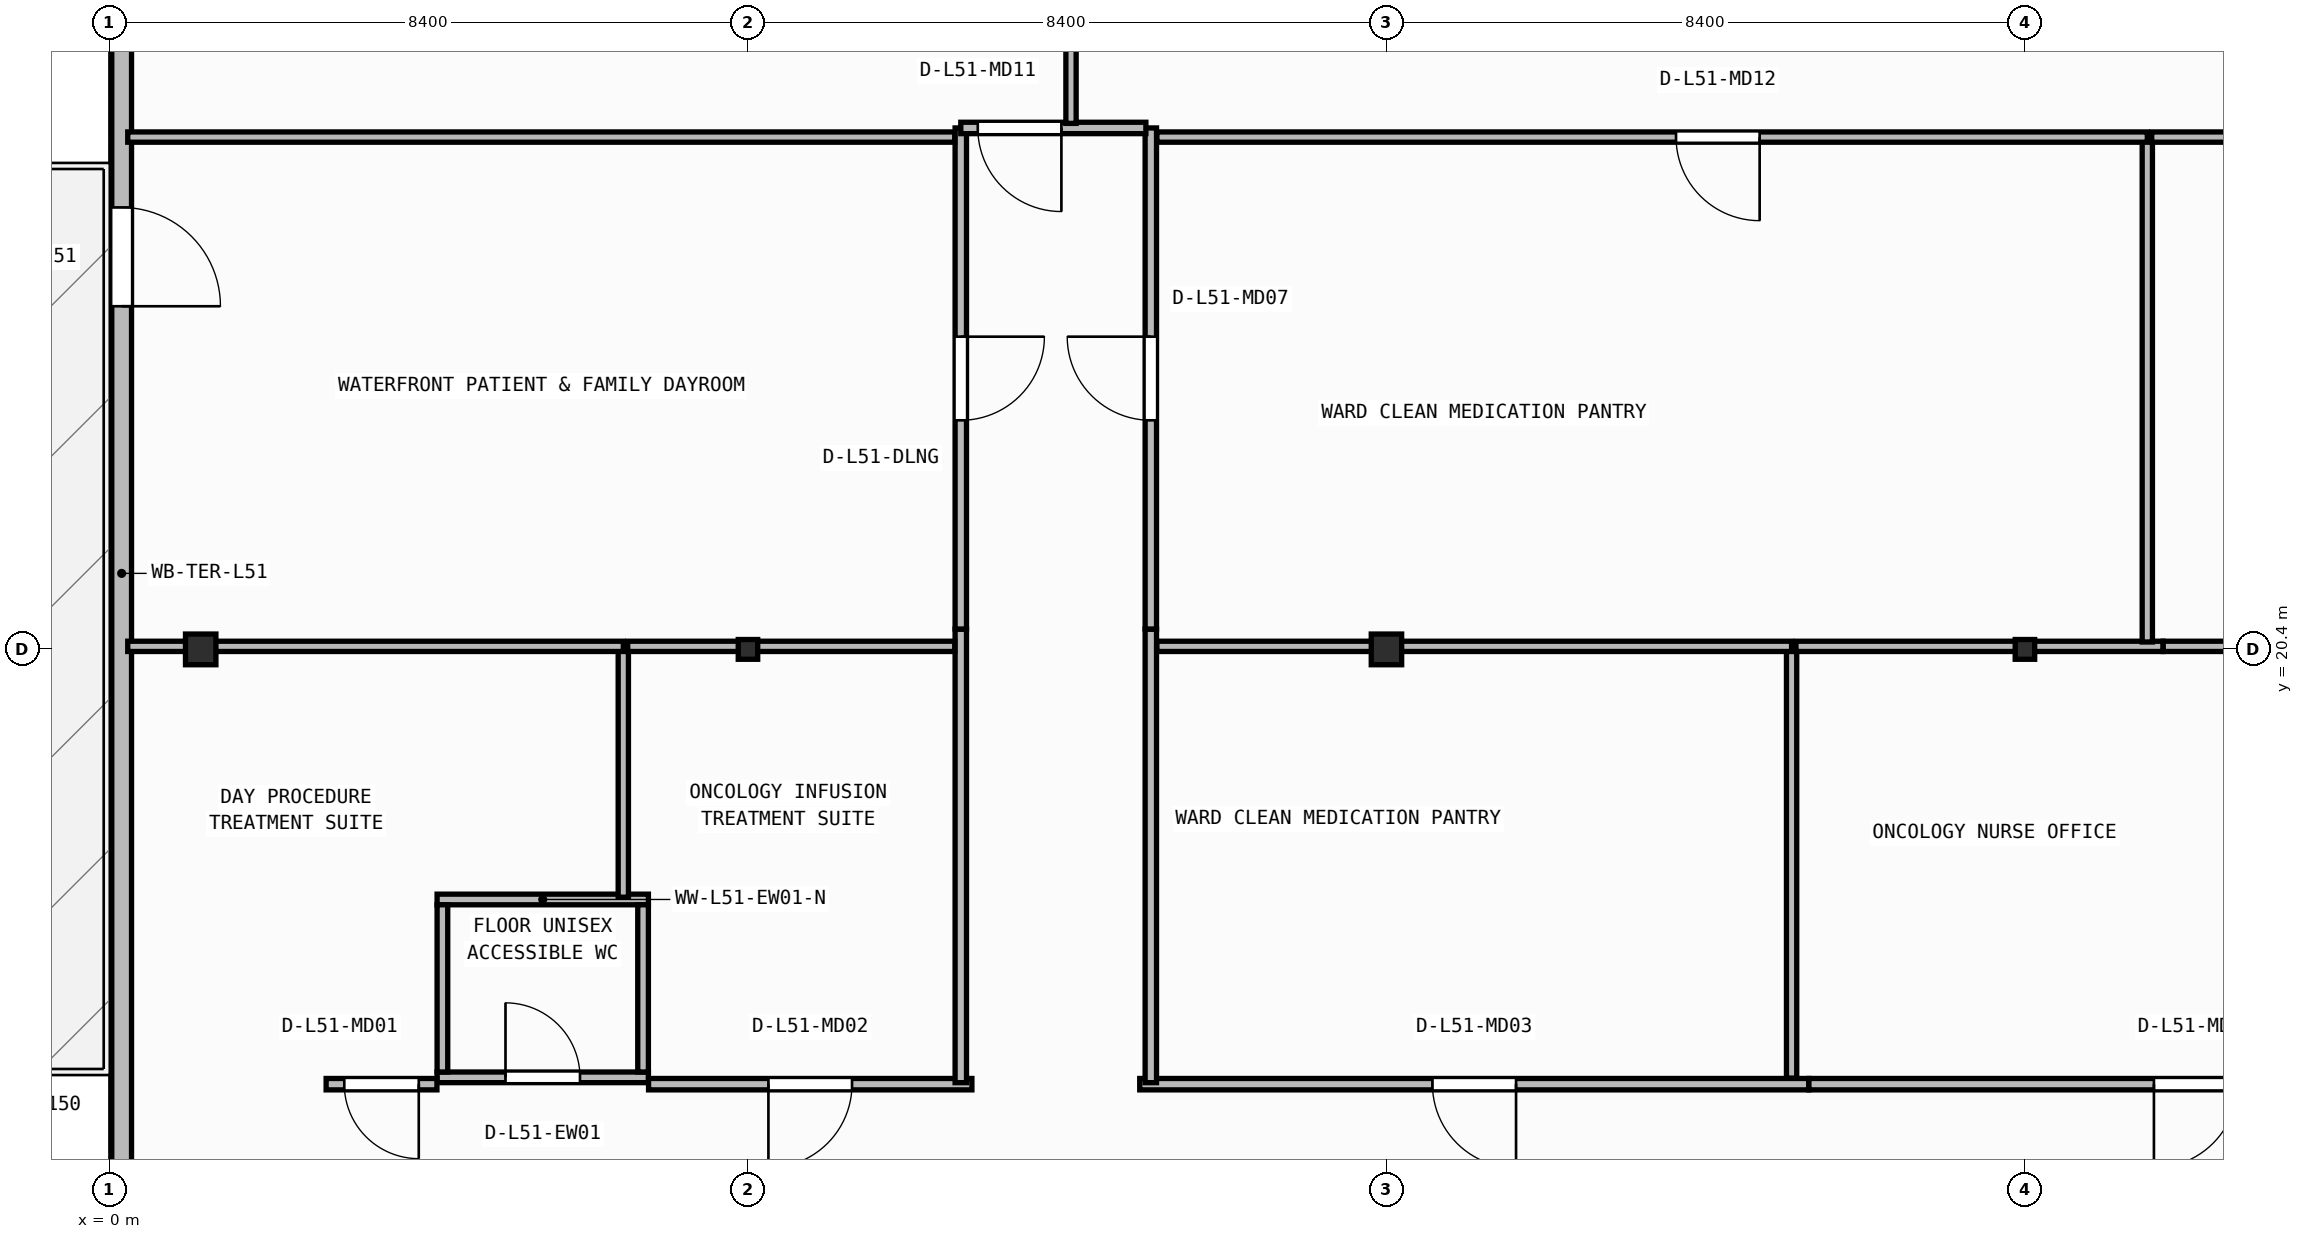
"""IFC4 building model, lengths in metres.
Left out: names, types, materials, properties, quantities, classifications, styles, units other than length and angle.
Written with IfcOpenShell. Run it as: python <this file> out.ifc"""

import sys

from ifc_helpers import new_model, si_unit, direction, frame, frame_2d, origin, origin_2d, place, context, subcontext, project, spatial, rectangle, i_section, extrude, element, fill, save


model = new_model("IFC4")
c1 = context("Model", 3, precision=1e-05, world=origin(), true_north=direction((0.0, 1.0)))
c2 = subcontext(c1, "Body", "Model", "MODEL_VIEW")
j1 = project(units=[si_unit("LENGTHUNIT", "METRE"), si_unit("PLANEANGLEUNIT", "RADIAN")], contexts=[c1])
p1 = place(None, origin())
s1 = spatial("IfcSite", under=j1, at=p1, CompositionType="ELEMENT")
p2 = place(p1, origin())
s2 = spatial("IfcBuilding", under=s1, at=p2, CompositionType="ELEMENT")
p3 = place(p2, frame((0.0, 0.0, 207.9)))
s3 = spatial("IfcBuildingStorey", under=s2, at=p3, CompositionType="ELEMENT", Elevation=207.9)
p4 = place(p3, frame((1.2, 20.4, 0.0), z_axis=(0.0, 0.0, 1.0), x_axis=(1.0, 0.0, 0.0)))
e1 = element("IfcColumn", 1, at=p4, inside=s3, PredefinedType="COLUMN", context=c2, shape_type="SweptSolid", body=[
    extrude(i_section(OverallWidth=0.4, OverallDepth=0.404, WebThickness=0.02, FlangeThickness=0.032, at=origin_2d()), origin(), (0.0, 0.0, 1.0), 3.95),
])
p5 = place(p3, frame((8.4, 20.4, 0.0), z_axis=(0.0, 0.0, 1.0), x_axis=(1.0, 0.0, 0.0)))
e2 = element("IfcColumn", 2, at=p5, inside=s3, PredefinedType="COLUMN", context=c2, shape_type="SweptSolid", body=[
    extrude(i_section(OverallWidth=0.256, OverallDepth=0.26, WebThickness=0.01, FlangeThickness=0.017, FilletRadius=0.013, at=origin_2d()), origin(), (0.0, 0.0, 1.0), 3.95),
])
p6 = place(p3, frame((16.8, 20.4, 0.0), z_axis=(0.0, 0.0, 1.0), x_axis=(1.0, 0.0, 0.0)))
e3 = element("IfcColumn", 3, at=p6, inside=s3, PredefinedType="COLUMN", context=c2, shape_type="SweptSolid", body=[
    extrude(i_section(OverallWidth=0.4, OverallDepth=0.404, WebThickness=0.02, FlangeThickness=0.032, at=origin_2d()), origin(), (0.0, 0.0, 1.0), 3.95),
])
p7 = place(p3, frame((25.2, 20.4, 0.0), z_axis=(0.0, 0.0, 1.0), x_axis=(1.0, 0.0, 0.0)))
e4 = element("IfcColumn", 4, at=p7, inside=s3, PredefinedType="COLUMN", context=c2, shape_type="SweptSolid", body=[
    extrude(i_section(OverallWidth=0.256, OverallDepth=0.26, WebThickness=0.01, FlangeThickness=0.017, FilletRadius=0.013, at=origin_2d()), origin(), (0.0, 0.0, 1.0), 3.95),
])
p8 = place(p3, frame((0.16, 40.14, 0.0), z_axis=(0.0, 0.0, 1.0), x_axis=(0.0, -1.0, 0.0)))
e5 = element("IfcWall", 5, at=p8, inside=s3, PredefinedType="STANDARD", context=c2, shape_type="SweptSolid", body=[
    extrude(rectangle(XDim=37.48, YDim=0.26, at=frame_2d((18.74, 0.0))), origin(), (0.0, 0.0, 1.0), 3.71),
])
p9 = place(p8, frame((13.926, 0.0, 0.0)))
e6 = element("IfcOpeningElement", 6, at=p9, cuts=e5, PredefinedType="OPENING", context=c2, shape_type="SweptSolid", body=[
    extrude(rectangle(XDim=1.3, YDim=2.15, at=frame_2d((0.65, 1.075))), frame((0.0, 0.14, 0.0), z_axis=(0.0, -1.0, 0.0), x_axis=(1.0, 0.0, 0.0)), (0.0, 0.0, 1.0), 0.28),
])
p10 = place(p3, frame((4.31, 14.77, 0.0), z_axis=(0.0, 0.0, 1.0), x_axis=(1.0, 0.0, 0.0)))
e7 = element("IfcWall", 7, at=p10, inside=s3, PredefinedType="PARTITIONING", context=c2, shape_type="SweptSolid", body=[
    extrude(rectangle(XDim=2.78, YDim=0.14, at=frame_2d((1.39, 0.0))), origin(), (0.0, 0.0, 1.0), 3.71),
])
p11 = place(p10, frame((0.9, 0.0, 0.0)))
e8 = element("IfcOpeningElement", 8, at=p11, cuts=e7, PredefinedType="OPENING", context=c2, shape_type="SweptSolid", body=[
    extrude(rectangle(XDim=0.98, YDim=2.1, at=frame_2d((0.49, 1.05))), frame((0.0, 0.08, 0.0), z_axis=(0.0, -1.0, 0.0), x_axis=(1.0, 0.0, 0.0)), (0.0, 0.0, 1.0), 0.16),
])
p12 = place(p3, frame((4.31, 17.11, 0.0), z_axis=(0.0, 0.0, 1.0), x_axis=(1.0, 0.0, 0.0)))
e9 = element("IfcWall", 9, at=p12, inside=s3, PredefinedType="PARTITIONING", context=c2, shape_type="SweptSolid", body=[
    extrude(rectangle(XDim=2.78, YDim=0.14, at=frame_2d((1.39, 0.0))), origin(), (0.0, 0.0, 1.0), 3.71),
])
for number, where, z_axis, x_axis in (
    (10, (4.38, 14.84, 0.0), (0.0, 0.0, 1.0), (0.0, 1.0, 0.0)),
    (11, (7.02, 14.84, 0.0), (0.0, 0.0, 1.0), (0.0, 1.0, 0.0)),
):
    element("IfcWall", number, at=place(p3, frame(where, z_axis=z_axis, x_axis=x_axis)), inside=s3, PredefinedType="PARTITIONING", context=c2, shape_type="SweptSolid", body=[
        extrude(rectangle(XDim=2.2, YDim=0.14, at=frame_2d((1.1, 0.0))), origin(), (0.0, 0.0, 1.0), 3.71),
    ])
p13 = place(p3, frame((4.308, 14.68, 0.0), z_axis=(0.0, 0.0, 1.0), x_axis=(-1.0, 0.0, 0.0)))
e12 = element("IfcWall", 12, at=p13, inside=s3, PredefinedType="PARTITIONING", context=c2, shape_type="SweptSolid", body=[
    extrude(rectangle(XDim=1.458, YDim=0.15, at=frame_2d((0.729, 0.0))), origin(), (0.0, 0.0, 1.0), 3.71),
])
p14 = place(p13, frame((0.239, 0.0, 0.0)))
e13 = element("IfcOpeningElement", 13, at=p14, cuts=e12, PredefinedType="OPENING", context=c2, shape_type="SweptSolid", body=[
    extrude(rectangle(XDim=0.98, YDim=2.1, at=frame_2d((0.49, 1.05))), frame((0.0, 0.085, 0.0), z_axis=(0.0, -1.0, 0.0), x_axis=(1.0, 0.0, 0.0)), (0.0, 0.0, 1.0), 0.17),
])
p15 = place(p3, frame((11.346, 14.68, 0.0), z_axis=(0.0, 0.0, 1.0), x_axis=(-1.0, 0.0, 0.0)))
e14 = element("IfcWall", 14, at=p15, inside=s3, PredefinedType="PARTITIONING", context=c2, shape_type="SweptSolid", body=[
    extrude(rectangle(XDim=4.254, YDim=0.15, at=frame_2d((2.127, 0.0))), origin(), (0.0, 0.0, 1.0), 3.71),
])
p16 = place(p15, frame((1.577, 0.0, 0.0)))
e15 = element("IfcOpeningElement", 15, at=p16, cuts=e14, PredefinedType="OPENING", context=c2, shape_type="SweptSolid", body=[
    extrude(rectangle(XDim=1.1, YDim=2.1, at=frame_2d((0.55, 1.05))), frame((0.0, 0.085, 0.0), z_axis=(0.0, -1.0, 0.0), x_axis=(1.0, 0.0, 0.0)), (0.0, 0.0, 1.0), 0.17),
])
p17 = place(p3, frame((22.356, 14.68, 0.0), z_axis=(0.0, 0.0, 1.0), x_axis=(-1.0, 0.0, 0.0)))
e16 = element("IfcWall", 16, at=p17, inside=s3, PredefinedType="PARTITIONING", context=c2, shape_type="SweptSolid", body=[
    extrude(rectangle(XDim=8.802, YDim=0.15, at=frame_2d((4.401, 0.0))), origin(), (0.0, 0.0, 1.0), 3.71),
])
p18 = place(p17, frame((3.851, 0.0, 0.0)))
e17 = element("IfcOpeningElement", 17, at=p18, cuts=e16, PredefinedType="OPENING", context=c2, shape_type="SweptSolid", body=[
    extrude(rectangle(XDim=1.1, YDim=2.1, at=frame_2d((0.55, 1.05))), frame((0.0, 0.085, 0.0), z_axis=(0.0, -1.0, 0.0), x_axis=(1.0, 0.0, 0.0)), (0.0, 0.0, 1.0), 0.17),
])
p19 = place(p3, frame((32.536, 14.68, 0.0), z_axis=(0.0, 0.0, 1.0), x_axis=(-1.0, 0.0, 0.0)))
e18 = element("IfcWall", 18, at=p19, inside=s3, PredefinedType="PARTITIONING", context=c2, shape_type="SweptSolid", body=[
    extrude(rectangle(XDim=10.178, YDim=0.15, at=frame_2d((5.089, 0.0))), origin(), (0.0, 0.0, 1.0), 3.71),
])
p20 = place(p19, frame((4.539, 0.0, 0.0)))
e19 = element("IfcOpeningElement", 19, at=p20, cuts=e18, PredefinedType="OPENING", context=c2, shape_type="SweptSolid", body=[
    extrude(rectangle(XDim=1.1, YDim=2.1, at=frame_2d((0.55, 1.05))), frame((0.0, 0.085, 0.0), z_axis=(0.0, -1.0, 0.0), x_axis=(1.0, 0.0, 0.0)), (0.0, 0.0, 1.0), 0.17),
])
for number, where, z_axis, x_axis in (
    (20, (11.2, 20.666, 0.0), (0.0, 0.0, 1.0), (0.0, -1.0, 0.0)),
    (21, (13.7, 14.7, 0.0), (0.0, 0.0, 1.0), (0.0, 1.0, 0.0)),
):
    element("IfcWall", number, at=place(p3, frame(where, z_axis=z_axis, x_axis=x_axis)), inside=s3, PredefinedType="PARTITIONING", context=c2, shape_type="SweptSolid", body=[
        extrude(rectangle(XDim=5.966, YDim=0.15, at=frame_2d((2.983, 0.0))), origin(), (0.0, 0.0, 1.0), 3.71),
    ])
p21 = place(p3, frame((11.2, 27.26, 0.0), z_axis=(0.0, 0.0, 1.0), x_axis=(0.0, -1.0, 0.0)))
e22 = element("IfcWall", 22, at=p21, inside=s3, PredefinedType="PARTITIONING", context=c2, shape_type="SweptSolid", body=[
    extrude(rectangle(XDim=6.592, YDim=0.15, at=frame_2d((3.296, 0.0))), origin(), (0.0, 0.0, 1.0), 3.71),
])
p22 = place(p21, frame((2.746, 0.0, 0.0)))
e23 = element("IfcOpeningElement", 23, at=p22, cuts=e22, PredefinedType="OPENING", context=c2, shape_type="SweptSolid", body=[
    extrude(rectangle(XDim=1.1, YDim=2.1, at=frame_2d((0.55, 1.05))), frame((0.0, 0.085, 0.0), z_axis=(0.0, -1.0, 0.0), x_axis=(1.0, 0.0, 0.0)), (0.0, 0.0, 1.0), 0.17),
])
p23 = place(p3, frame((13.7, 20.668, 0.0), z_axis=(0.0, 0.0, 1.0), x_axis=(0.0, 1.0, 0.0)))
e24 = element("IfcWall", 24, at=p23, inside=s3, PredefinedType="PARTITIONING", context=c2, shape_type="SweptSolid", body=[
    extrude(rectangle(XDim=6.592, YDim=0.15, at=frame_2d((3.296, 0.0))), origin(), (0.0, 0.0, 1.0), 3.71),
])
p24 = place(p23, frame((2.746, 0.0, 0.0)))
e25 = element("IfcOpeningElement", 25, at=p24, cuts=e24, PredefinedType="OPENING", context=c2, shape_type="SweptSolid", body=[
    extrude(rectangle(XDim=1.1, YDim=2.1, at=frame_2d((0.55, 1.05))), frame((0.0, 0.085, 0.0), z_axis=(0.0, -1.0, 0.0), x_axis=(1.0, 0.0, 0.0)), (0.0, 0.0, 1.0), 0.17),
])
p25 = place(p3, frame((13.635, 27.26, 0.0), z_axis=(0.0, 0.0, 1.0), x_axis=(-1.0, 0.0, 0.0)))
e26 = element("IfcWall", 26, at=p25, inside=s3, PredefinedType="PARTITIONING", context=c2, shape_type="SweptSolid", body=[
    extrude(rectangle(XDim=2.435, YDim=0.15, at=frame_2d((1.218, 0.0))), origin(), (0.0, 0.0, 1.0), 3.71),
])
p26 = place(p25, frame((1.112, 0.0, 0.0)))
e27 = element("IfcOpeningElement", 27, at=p26, cuts=e26, PredefinedType="OPENING", context=c2, shape_type="SweptSolid", body=[
    extrude(rectangle(XDim=1.1, YDim=2.1, at=frame_2d((0.55, 1.05))), frame((0.0, 0.085, 0.0), z_axis=(0.0, -1.0, 0.0), x_axis=(1.0, 0.0, 0.0)), (0.0, 0.0, 1.0), 0.17),
])
p27 = place(p3, frame((6.76, 17.14, 0.0), z_axis=(0.0, 0.0, 1.0), x_axis=(0.0, 1.0, 0.0)))
e28 = element("IfcWall", 28, at=p27, inside=s3, PredefinedType="PARTITIONING", context=c2, shape_type="SweptSolid", body=[
    extrude(rectangle(XDim=3.3, YDim=0.135, at=frame_2d((1.65, 0.0))), origin(), (0.0, 0.0, 1.0), 3.71),
])
p28 = place(p3, frame((6.76, 20.44, 0.0), z_axis=(0.0, 0.0, 1.0), x_axis=(-1.0, 0.0, 0.0)))
e29 = element("IfcWall", 29, at=p28, inside=s3, PredefinedType="PARTITIONING", context=c2, shape_type="SweptSolid", body=[
    extrude(rectangle(XDim=6.52, YDim=0.135, at=frame_2d((3.26, 0.0))), origin(), (0.0, 0.0, 1.0), 3.152),
])
p29 = place(p3, frame((11.12, 20.44, 0.0), z_axis=(0.0, 0.0, 1.0), x_axis=(-1.0, 0.0, 0.0)))
e30 = element("IfcWall", 30, at=p29, inside=s3, PredefinedType="PARTITIONING", context=c2, shape_type="SweptSolid", body=[
    extrude(rectangle(XDim=4.303, YDim=0.135, at=frame_2d((2.151, 0.0))), origin(), (0.0, 0.0, 1.0), 3.152),
])
p30 = place(p3, frame((22.13, 14.76, 0.0), z_axis=(0.0, 0.0, 1.0), x_axis=(0.0, 1.0, 0.0)))
e31 = element("IfcWall", 31, at=p30, inside=s3, PredefinedType="PARTITIONING", context=c2, shape_type="SweptSolid", body=[
    extrude(rectangle(XDim=5.68, YDim=0.135, at=frame_2d((2.84, 0.0))), origin(), (0.0, 0.0, 1.0), 3.71),
])
p31 = place(p3, frame((22.13, 20.44, 0.0), z_axis=(0.0, 0.0, 1.0), x_axis=(-1.0, 0.0, 0.0)))
e32 = element("IfcWall", 32, at=p31, inside=s3, PredefinedType="PARTITIONING", context=c2, shape_type="SweptSolid", body=[
    extrude(rectangle(XDim=8.35, YDim=0.135, at=frame_2d((4.175, 0.0))), origin(), (0.0, 0.0, 1.0), 3.152),
])
p32 = place(p3, frame((27.018, 20.44, 0.0), z_axis=(0.0, 0.0, 1.0), x_axis=(-1.0, 0.0, 0.0)))
e33 = element("IfcWall", 33, at=p32, inside=s3, PredefinedType="PARTITIONING", context=c2, shape_type="SweptSolid", body=[
    extrude(rectangle(XDim=4.83, YDim=0.135, at=frame_2d((2.415, 0.0))), origin(), (0.0, 0.0, 1.0), 3.152),
])
p33 = place(p3, frame((32.31, 20.44, 0.0), z_axis=(0.0, 0.0, 1.0), x_axis=(-1.0, 0.0, 0.0)))
e34 = element("IfcWall", 34, at=p33, inside=s3, PredefinedType="PARTITIONING", context=c2, shape_type="SweptSolid", body=[
    extrude(rectangle(XDim=5.291, YDim=0.135, at=frame_2d((2.645, 0.0))), origin(), (0.0, 0.0, 1.0), 3.152),
])
p34 = place(p33, frame((2.379, 0.0, 0.0)))
e35 = element("IfcOpeningElement", 35, at=p34, cuts=e34, PredefinedType="OPENING", context=c2, shape_type="SweptSolid", body=[
    extrude(rectangle(XDim=1.1, YDim=2.1, at=frame_2d((0.55, 1.05))), frame((0.0, 0.077, 0.0), z_axis=(0.0, -1.0, 0.0), x_axis=(1.0, 0.0, 0.0)), (0.0, 0.0, 1.0), 0.155),
])
p35 = place(p3, frame((11.12, 27.14, 0.0), z_axis=(0.0, 0.0, 1.0), x_axis=(-1.0, 0.0, 0.0)))
e36 = element("IfcWall", 36, at=p35, inside=s3, PredefinedType="PARTITIONING", context=c2, shape_type="SweptSolid", body=[
    extrude(rectangle(XDim=10.88, YDim=0.135, at=frame_2d((5.44, 0.0))), origin(), (0.0, 0.0, 1.0), 3.71),
])
p36 = place(p3, frame((26.81, 20.498, 0.0), z_axis=(0.0, 0.0, 1.0), x_axis=(0.0, 1.0, 0.0)))
e37 = element("IfcWall", 37, at=p36, inside=s3, PredefinedType="PARTITIONING", context=c2, shape_type="SweptSolid", body=[
    extrude(rectangle(XDim=6.642, YDim=0.135, at=frame_2d((3.321, 0.0))), origin(), (0.0, 0.0, 1.0), 3.71),
])
p37 = place(p3, frame((26.81, 27.14, 0.0), z_axis=(0.0, 0.0, 1.0), x_axis=(-1.0, 0.0, 0.0)))
e38 = element("IfcWall", 38, at=p37, inside=s3, PredefinedType="PARTITIONING", context=c2, shape_type="SweptSolid", body=[
    extrude(rectangle(XDim=13.03, YDim=0.135, at=frame_2d((6.515, 0.0))), origin(), (0.0, 0.0, 1.0), 3.71),
])
p38 = place(p37, frame((5.1, 0.0, 0.0)))
e39 = element("IfcOpeningElement", 39, at=p38, cuts=e38, PredefinedType="OPENING", context=c2, shape_type="SweptSolid", body=[
    extrude(rectangle(XDim=1.1, YDim=2.1, at=frame_2d((0.55, 1.05))), frame((0.0, 0.077, 0.0), z_axis=(0.0, -1.0, 0.0), x_axis=(1.0, 0.0, 0.0)), (0.0, 0.0, 1.0), 0.155),
])
p39 = place(p3, frame((28.988, 27.14, 0.0), z_axis=(0.0, 0.0, 1.0), x_axis=(-1.0, 0.0, 0.0)))
e40 = element("IfcWall", 40, at=p39, inside=s3, PredefinedType="PARTITIONING", context=c2, shape_type="SweptSolid", body=[
    extrude(rectangle(XDim=2.12, YDim=0.135, at=frame_2d((1.06, 0.0))), origin(), (0.0, 0.0, 1.0), 3.71),
])
p40 = place(p3, frame((12.65, 27.32, 0.0), z_axis=(0.0, 0.0, 1.0), x_axis=(0.0, 1.0, 0.0)))
e41 = element("IfcWall", 41, at=p40, inside=s3, PredefinedType="PARTITIONING", context=c2, shape_type="SweptSolid", body=[
    extrude(rectangle(XDim=8.724, YDim=0.135, at=frame_2d((4.362, 0.0))), origin(), (0.0, 0.0, 1.0), 3.71),
])
p41 = place(p9, origin())
e42 = element("IfcDoor", 42, at=p41, inside=s3, OperationType="SINGLE_SWING_RIGHT", PredefinedType="DOOR", context=c2, shape_type="SweptSolid", body=[
    extrude(rectangle(XDim=1.3, YDim=2.15, at=frame_2d((0.65, 1.075))), frame((0.0, 0.025, 0.0), z_axis=(0.0, -1.0, 0.0), x_axis=(1.0, 0.0, 0.0)), (0.0, 0.0, 1.0), 0.05),
])
fill(e6, e42)
p42 = place(p11, origin())
e43 = element("IfcDoor", 43, at=p42, inside=s3, OperationType="SINGLE_SWING_LEFT", PredefinedType="DOOR", context=c2, shape_type="SweptSolid", body=[
    extrude(rectangle(XDim=0.98, YDim=2.1, at=frame_2d((0.49, 1.05))), frame((0.0, 0.025, 0.0), z_axis=(0.0, -1.0, 0.0), x_axis=(1.0, 0.0, 0.0)), (0.0, 0.0, 1.0), 0.05),
])
fill(e8, e43)
p43 = place(p14, origin())
e44 = element("IfcDoor", 44, at=p43, inside=s3, OperationType="SINGLE_SWING_LEFT", PredefinedType="DOOR", context=c2, shape_type="SweptSolid", body=[
    extrude(rectangle(XDim=0.98, YDim=2.1, at=frame_2d((0.49, 1.05))), frame((0.0, 0.025, 0.0), z_axis=(0.0, -1.0, 0.0), x_axis=(1.0, 0.0, 0.0)), (0.0, 0.0, 1.0), 0.05),
])
fill(e13, e44)
p44 = place(p16, origin())
e45 = element("IfcDoor", 45, at=p44, inside=s3, OperationType="SINGLE_SWING_RIGHT", PredefinedType="DOOR", context=c2, shape_type="SweptSolid", body=[
    extrude(rectangle(XDim=1.1, YDim=2.1, at=frame_2d((0.55, 1.05))), frame((0.0, 0.025, 0.0), z_axis=(0.0, -1.0, 0.0), x_axis=(1.0, 0.0, 0.0)), (0.0, 0.0, 1.0), 0.05),
])
fill(e15, e45)
p45 = place(p18, origin())
e46 = element("IfcDoor", 46, at=p45, inside=s3, OperationType="SINGLE_SWING_LEFT", PredefinedType="DOOR", context=c2, shape_type="SweptSolid", body=[
    extrude(rectangle(XDim=1.1, YDim=2.1, at=frame_2d((0.55, 1.05))), frame((0.0, 0.025, 0.0), z_axis=(0.0, -1.0, 0.0), x_axis=(1.0, 0.0, 0.0)), (0.0, 0.0, 1.0), 0.05),
])
fill(e17, e46)
p46 = place(p20, origin())
e47 = element("IfcDoor", 47, at=p46, inside=s3, OperationType="SINGLE_SWING_RIGHT", PredefinedType="DOOR", context=c2, shape_type="SweptSolid", body=[
    extrude(rectangle(XDim=1.1, YDim=2.1, at=frame_2d((0.55, 1.05))), frame((0.0, 0.025, 0.0), z_axis=(0.0, -1.0, 0.0), x_axis=(1.0, 0.0, 0.0)), (0.0, 0.0, 1.0), 0.05),
])
fill(e19, e47)
p47 = place(p22, origin())
e48 = element("IfcDoor", 48, at=p47, inside=s3, OperationType="SINGLE_SWING_LEFT", PredefinedType="DOOR", context=c2, shape_type="SweptSolid", body=[
    extrude(rectangle(XDim=1.1, YDim=2.1, at=frame_2d((0.55, 1.05))), frame((0.0, 0.025, 0.0), z_axis=(0.0, -1.0, 0.0), x_axis=(1.0, 0.0, 0.0)), (0.0, 0.0, 1.0), 0.05),
])
fill(e23, e48)
p48 = place(p24, origin())
e49 = element("IfcDoor", 49, at=p48, inside=s3, OperationType="SINGLE_SWING_RIGHT", PredefinedType="DOOR", context=c2, shape_type="SweptSolid", body=[
    extrude(rectangle(XDim=1.1, YDim=2.1, at=frame_2d((0.55, 1.05))), frame((0.0, 0.025, 0.0), z_axis=(0.0, -1.0, 0.0), x_axis=(1.0, 0.0, 0.0)), (0.0, 0.0, 1.0), 0.05),
])
fill(e25, e49)
p49 = place(p26, origin())
e50 = element("IfcDoor", 50, at=p49, inside=s3, OperationType="SINGLE_SWING_LEFT", PredefinedType="DOOR", context=c2, shape_type="SweptSolid", body=[
    extrude(rectangle(XDim=1.1, YDim=2.1, at=frame_2d((0.55, 1.05))), frame((0.0, 0.025, 0.0), z_axis=(0.0, -1.0, 0.0), x_axis=(1.0, 0.0, 0.0)), (0.0, 0.0, 1.0), 0.05),
])
fill(e27, e50)
p50 = place(p38, origin())
e51 = element("IfcDoor", 51, at=p50, inside=s3, OperationType="SINGLE_SWING_LEFT", PredefinedType="DOOR", context=c2, shape_type="SweptSolid", body=[
    extrude(rectangle(XDim=1.1, YDim=2.1, at=frame_2d((0.55, 1.05))), frame((0.0, 0.025, 0.0), z_axis=(0.0, -1.0, 0.0), x_axis=(1.0, 0.0, 0.0)), (0.0, 0.0, 1.0), 0.05),
])
fill(e39, e51)
save(model, sys.argv[1])
